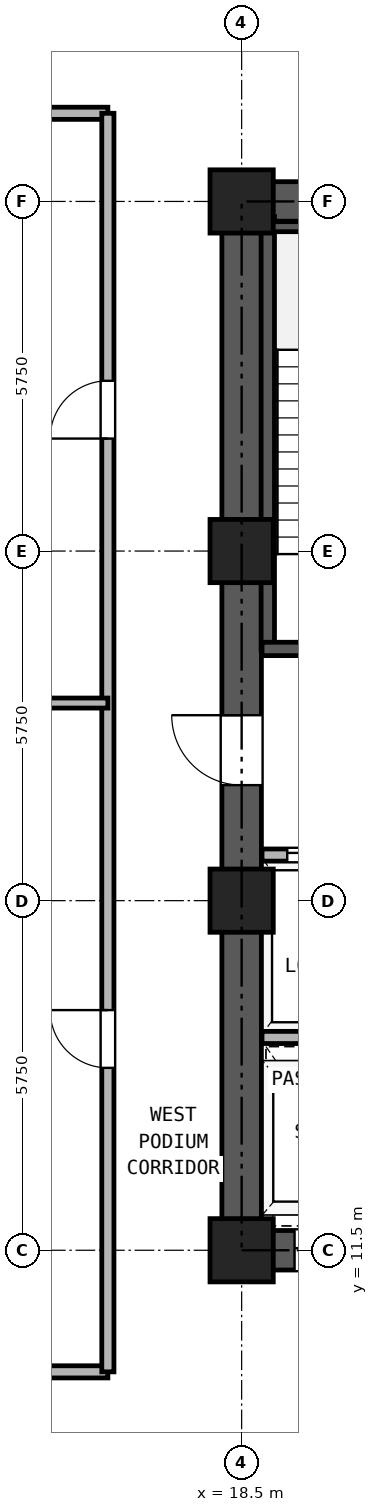
"""IFC4 building model, lengths in metres.
Left out: names, types, materials, properties, quantities, classifications, styles, units other than length and angle.
Written with IfcOpenShell. Run it as: python <this file> out.ifc"""

import sys

from ifc_helpers import new_model, si_unit, direction, frame, frame_2d, origin, origin_2d, place, context, subcontext, project, spatial, rectangle, hollow_rectangle, extrude, source, transform, mapped, element, fill, save


model = new_model("IFC4")
c1 = context("Model", 3, precision=1e-05, world=origin(), true_north=direction((0.0, 1.0)))
c2 = subcontext(c1, "Body", "Model", "MODEL_VIEW")
j1 = project(units=[si_unit("LENGTHUNIT", "METRE"), si_unit("PLANEANGLEUNIT", "RADIAN")], contexts=[c1])
p1 = place(None, origin())
s1 = spatial("IfcSite", under=j1, at=p1, CompositionType="ELEMENT")
p2 = place(p1, origin())
s2 = spatial("IfcBuilding", under=s1, at=p2, CompositionType="ELEMENT")
p3 = place(p2, frame((0.0, 0.0, 13.5)))
s3 = spatial("IfcBuildingStorey", under=s2, at=p3, CompositionType="ELEMENT", Elevation=13.5)
m1 = source(origin(), c2, "Body", "SweptSolid", [
    extrude(hollow_rectangle(XDim=1.04, YDim=1.04, WallThickness=0.065, at=origin_2d()), origin(), (0.0, 0.0, 1.0), 4.18),
])
for number, where, z_axis, x_axis in (
    (1, (18.5, 11.5, 0.0), (0.0, 0.0, 1.0), (1.0, 0.0, 0.0)),
    (2, (18.5, 17.25, 0.0), (0.0, 0.0, 1.0), (1.0, 0.0, 0.0)),
    (3, (18.5, 23.0, 0.0), (0.0, 0.0, 1.0), (1.0, 0.0, 0.0)),
    (4, (18.5, 28.75, 0.0), (0.0, 0.0, 1.0), (1.0, 0.0, 0.0)),
):
    element("IfcColumn", number, at=place(p3, frame(where, z_axis=z_axis, x_axis=x_axis)), inside=s3, PredefinedType="COLUMN", context=c2, shape_type="MappedRepresentation", body=[
        mapped(m1, transform((0.0, 0.0, 0.0), x_axis=(1.0, 0.0, 0.0), y_axis=(0.0, 1.0, 0.0), z_axis=(0.0, 0.0, 1.0), scale=1.0)),
    ])
p4 = place(p3, frame((18.175, 11.5, 0.0), z_axis=(0.0, 0.0, 1.0), x_axis=(1.0, 0.0, 0.0)))
e5 = element("IfcWall", 5, at=p4, inside=s3, PredefinedType="SHEAR", context=c2, shape_type="SweptSolid", body=[
    extrude(rectangle(XDim=10.65, YDim=0.65, at=frame_2d((5.325, 0.0))), origin(), (0.0, 0.0, 1.0), 4.18),
])
p5 = place(p4, frame((1.195, 0.0, 0.0)))
e6 = element("IfcOpeningElement", 6, at=p5, cuts=e5, PredefinedType="OPENING", context=c2, shape_type="SweptSolid", body=[
    extrude(rectangle(XDim=1.1, YDim=2.25, at=frame_2d((0.55, 1.125))), frame((0.0, 0.335, 0.0), z_axis=(0.0, -1.0, 0.0), x_axis=(1.0, 0.0, 0.0)), (0.0, 0.0, 1.0), 0.67),
])
p6 = place(p4, frame((3.495, 0.0, 0.0)))
e7 = element("IfcOpeningElement", 7, at=p6, cuts=e5, PredefinedType="OPENING", context=c2, shape_type="SweptSolid", body=[
    extrude(rectangle(XDim=1.1, YDim=2.25, at=frame_2d((0.55, 1.125))), frame((0.0, 0.335, 0.0), z_axis=(0.0, -1.0, 0.0), x_axis=(1.0, 0.0, 0.0)), (0.0, 0.0, 1.0), 0.67),
])
p7 = place(p4, frame((5.925, 0.0, 0.0)))
e8 = element("IfcOpeningElement", 8, at=p7, cuts=e5, PredefinedType="OPENING", context=c2, shape_type="SweptSolid", body=[
    extrude(rectangle(XDim=1.1, YDim=2.25, at=frame_2d((0.55, 1.125))), frame((0.0, 0.335, 0.0), z_axis=(0.0, -1.0, 0.0), x_axis=(1.0, 0.0, 0.0)), (0.0, 0.0, 1.0), 0.67),
])
p8 = place(p4, frame((8.325, 0.0, 0.0)))
e9 = element("IfcOpeningElement", 9, at=p8, cuts=e5, PredefinedType="OPENING", context=c2, shape_type="SweptSolid", body=[
    extrude(rectangle(XDim=1.1, YDim=2.25, at=frame_2d((0.55, 1.125))), frame((0.0, 0.335, 0.0), z_axis=(0.0, -1.0, 0.0), x_axis=(1.0, 0.0, 0.0)), (0.0, 0.0, 1.0), 0.67),
])
p9 = place(p3, frame((18.175, 28.75, 0.0), z_axis=(0.0, 0.0, 1.0), x_axis=(1.0, 0.0, 0.0)))
e10 = element("IfcWall", 10, at=p9, inside=s3, PredefinedType="SHEAR", context=c2, shape_type="SweptSolid", body=[
    extrude(rectangle(XDim=10.65, YDim=0.65, at=frame_2d((5.325, 0.0))), origin(), (0.0, 0.0, 1.0), 4.18),
])
p10 = place(p9, frame((4.205, 0.0, 0.0)))
e11 = element("IfcOpeningElement", 11, at=p10, cuts=e10, PredefinedType="OPENING", context=c2, shape_type="SweptSolid", body=[
    extrude(rectangle(XDim=0.9, YDim=2.05, at=frame_2d((0.45, 1.025))), frame((0.0, 0.335, 0.0), z_axis=(0.0, -1.0, 0.0), x_axis=(1.0, 0.0, 0.0)), (0.0, 0.0, 1.0), 0.67),
])
p11 = place(p9, frame((5.745, 0.0, 0.0)))
e12 = element("IfcOpeningElement", 12, at=p11, cuts=e10, PredefinedType="OPENING", context=c2, shape_type="SweptSolid", body=[
    extrude(rectangle(XDim=0.9, YDim=2.05, at=frame_2d((0.45, 1.025))), frame((0.0, 0.335, 0.0), z_axis=(0.0, -1.0, 0.0), x_axis=(1.0, 0.0, 0.0)), (0.0, 0.0, 1.0), 0.67),
])
p12 = place(p3, frame((18.5, 11.825, 0.0), z_axis=(0.0, 0.0, 1.0), x_axis=(0.0, 1.0, 0.0)))
e13 = element("IfcWall", 13, at=p12, inside=s3, PredefinedType="SHEAR", context=c2, shape_type="SweptSolid", body=[
    extrude(rectangle(XDim=16.6, YDim=0.65, at=frame_2d((8.3, 0.0))), origin(), (0.0, 0.0, 1.0), 4.18),
])
p13 = place(p12, frame((7.325, 0.0, 0.0)))
e14 = element("IfcOpeningElement", 14, at=p13, cuts=e13, PredefinedType="OPENING", context=c2, shape_type="SweptSolid", body=[
    extrude(rectangle(XDim=1.15, YDim=2.2, at=frame_2d((0.575, 1.1))), frame((0.0, 0.335, 0.0), z_axis=(0.0, -1.0, 0.0), x_axis=(1.0, 0.0, 0.0)), (0.0, 0.0, 1.0), 0.67),
])
p14 = place(p3, frame((18.93, 21.39, 0.0), z_axis=(0.0, 0.0, 1.0), x_axis=(0.0, 1.0, 0.0)))
e15 = element("IfcWall", 15, at=p14, inside=s3, PredefinedType="SOLIDWALL", context=c2, shape_type="SweptSolid", body=[
    extrude(rectangle(XDim=7.11, YDim=0.22, at=frame_2d((3.555, 0.0))), origin(), (0.0, 0.0, 1.0), 4.18),
])
p15 = place(p3, frame((18.835, 28.335, 0.0), z_axis=(0.0, 0.0, 1.0), x_axis=(1.0, 0.0, 0.0)))
e16 = element("IfcWall", 16, at=p15, inside=s3, PredefinedType="PARTITIONING", context=c2, shape_type="SweptSolid", body=[
    extrude(rectangle(XDim=3.275, YDim=0.165, at=frame_2d((1.638, 0.0))), origin(), (0.0, 0.0, 1.0), 4.18),
])
p16 = place(p3, frame((18.835, 21.39, 0.0), z_axis=(0.0, 0.0, 1.0), x_axis=(1.0, 0.0, 0.0)))
e17 = element("IfcWall", 17, at=p16, inside=s3, PredefinedType="SOLIDWALL", context=c2, shape_type="SweptSolid", body=[
    extrude(rectangle(XDim=6.295, YDim=0.22, at=frame_2d((3.147, 0.0))), origin(), (0.0, 0.0, 1.0), 4.18),
])
p17 = place(p16, frame((1.015, 0.0, 0.0)))
e18 = element("IfcOpeningElement", 18, at=p17, cuts=e17, PredefinedType="OPENING", context=c2, shape_type="SweptSolid", body=[
    extrude(rectangle(XDim=1.15, YDim=2.2, at=frame_2d((0.575, 1.1))), frame((0.0, 0.12, 0.0), z_axis=(0.0, -1.0, 0.0), x_axis=(1.0, 0.0, 0.0)), (0.0, 0.0, 1.0), 0.24),
])
p18 = place(p16, frame((4.745, 0.0, 0.0)))
e19 = element("IfcOpeningElement", 19, at=p18, cuts=e17, PredefinedType="OPENING", context=c2, shape_type="SweptSolid", body=[
    extrude(rectangle(XDim=1.1, YDim=2.25, at=frame_2d((0.55, 1.125))), frame((0.0, 0.12, 0.0), z_axis=(0.0, -1.0, 0.0), x_axis=(1.0, 0.0, 0.0)), (0.0, 0.0, 1.0), 0.24),
])
p19 = place(p3, frame((18.835, 18.0, 0.0), z_axis=(0.0, 0.0, 1.0), x_axis=(1.0, 0.0, 0.0)))
e20 = element("IfcWall", 20, at=p19, inside=s3, PredefinedType="PARTITIONING", context=c2, shape_type="SweptSolid", body=[
    extrude(rectangle(XDim=9.33, YDim=0.2, at=frame_2d((4.665, 0.0))), origin(), (0.0, 0.0, 1.0), 4.18),
])
p20 = place(p19, frame((0.415, 0.0, 0.0)))
e21 = element("IfcOpeningElement", 21, at=p20, cuts=e20, PredefinedType="OPENING", context=c2, shape_type="SweptSolid", body=[
    extrude(rectangle(XDim=1.3, YDim=2.3, at=frame_2d((0.65, 1.15))), frame((0.0, 0.11, 0.0), z_axis=(0.0, -1.0, 0.0), x_axis=(1.0, 0.0, 0.0)), (0.0, 0.0, 1.0), 0.22),
])
p21 = place(p19, frame((2.515, 0.0, 0.0)))
e22 = element("IfcOpeningElement", 22, at=p21, cuts=e20, PredefinedType="OPENING", context=c2, shape_type="SweptSolid", body=[
    extrude(rectangle(XDim=1.3, YDim=2.3, at=frame_2d((0.65, 1.15))), frame((0.0, 0.11, 0.0), z_axis=(0.0, -1.0, 0.0), x_axis=(1.0, 0.0, 0.0)), (0.0, 0.0, 1.0), 0.22),
])
p22 = place(p19, frame((4.915, 0.0, 0.0)))
e23 = element("IfcOpeningElement", 23, at=p22, cuts=e20, PredefinedType="OPENING", context=c2, shape_type="SweptSolid", body=[
    extrude(rectangle(XDim=0.9, YDim=2.05, at=frame_2d((0.45, 1.025))), frame((0.0, 0.11, 0.0), z_axis=(0.0, -1.0, 0.0), x_axis=(1.0, 0.0, 0.0)), (0.0, 0.0, 1.0), 0.22),
])
p23 = place(p19, frame((7.615, 0.0, 0.0)))
e24 = element("IfcOpeningElement", 24, at=p23, cuts=e20, PredefinedType="OPENING", context=c2, shape_type="SweptSolid", body=[
    extrude(rectangle(XDim=0.9, YDim=2.05, at=frame_2d((0.45, 1.025))), frame((0.0, 0.11, 0.0), z_axis=(0.0, -1.0, 0.0), x_axis=(1.0, 0.0, 0.0)), (0.0, 0.0, 1.0), 0.22),
])
p24 = place(p3, frame((18.835, 15.0, 0.0), z_axis=(0.0, 0.0, 1.0), x_axis=(1.0, 0.0, 0.0)))
e25 = element("IfcWall", 25, at=p24, inside=s3, PredefinedType="PARTITIONING", context=c2, shape_type="SweptSolid", body=[
    extrude(rectangle(XDim=9.33, YDim=0.2, at=frame_2d((4.665, 0.0))), origin(), (0.0, 0.0, 1.0), 4.18),
])
for number, where, z_axis, x_axis in (
    (26, (10.5, 9.5, 0.0), (0.0, 0.0, 1.0), (1.0, 0.0, 0.0)),
    (27, (10.5, 30.2, 0.0), (0.0, 0.0, 1.0), (1.0, 0.0, 0.0)),
):
    element("IfcWall", number, at=place(p3, frame(where, z_axis=z_axis, x_axis=x_axis)), inside=s3, PredefinedType="PARTITIONING", context=c2, shape_type="SweptSolid", body=[
        extrude(rectangle(XDim=5.8, YDim=0.2, at=frame_2d((2.9, 0.0))), origin(), (0.0, 0.0, 1.0), 4.18),
    ])
p25 = place(p3, frame((16.3, 9.5, 0.0), z_axis=(0.0, 0.0, 1.0), x_axis=(0.0, 1.0, 0.0)))
e28 = element("IfcWall", 28, at=p25, inside=s3, PredefinedType="PARTITIONING", context=c2, shape_type="SweptSolid", body=[
    extrude(rectangle(XDim=20.7, YDim=0.2, at=frame_2d((10.35, 0.0))), origin(), (0.0, 0.0, 1.0), 4.18),
])
p26 = place(p25, frame((5.0, 0.0, 0.0)))
e29 = element("IfcOpeningElement", 29, at=p26, cuts=e28, PredefinedType="OPENING", context=c2, shape_type="SweptSolid", body=[
    extrude(rectangle(XDim=0.95, YDim=2.15, at=frame_2d((0.475, 1.075))), frame((0.0, 0.11, 0.0), z_axis=(0.0, -1.0, 0.0), x_axis=(1.0, 0.0, 0.0)), (0.0, 0.0, 1.0), 0.22),
])
p27 = place(p25, frame((15.35, 0.0, 0.0)))
e30 = element("IfcOpeningElement", 30, at=p27, cuts=e28, PredefinedType="OPENING", context=c2, shape_type="SweptSolid", body=[
    extrude(rectangle(XDim=0.95, YDim=2.15, at=frame_2d((0.475, 1.075))), frame((0.0, 0.11, 0.0), z_axis=(0.0, -1.0, 0.0), x_axis=(1.0, 0.0, 0.0)), (0.0, 0.0, 1.0), 0.22),
])
p28 = place(p3, frame((0.25, 20.5, 0.0), z_axis=(0.0, 0.0, 1.0), x_axis=(1.0, 0.0, 0.0)))
e31 = element("IfcWall", 31, at=p28, inside=s3, PredefinedType="PARTITIONING", context=c2, shape_type="SweptSolid", body=[
    extrude(rectangle(XDim=16.05, YDim=0.165, at=frame_2d((8.025, 0.0))), origin(), (0.0, 0.0, 1.0), 4.18),
])
p29 = place(p20, origin())
e32 = element("IfcDoor", 32, at=p29, inside=s3, OperationType="DOUBLE_DOOR_SLIDING", PredefinedType="DOOR", context=c2, shape_type="SweptSolid", body=[
    extrude(rectangle(XDim=1.3, YDim=2.3, at=frame_2d((0.65, 1.15))), frame((0.0, 0.025, 0.0), z_axis=(0.0, -1.0, 0.0), x_axis=(1.0, 0.0, 0.0)), (0.0, 0.0, 1.0), 0.05),
])
fill(e21, e32)
p30 = place(p13, frame((1.15, 0.0, 0.0), z_axis=(0.0, 0.0, 1.0), x_axis=(-1.0, 0.0, 0.0)))
e33 = element("IfcDoor", 33, at=p30, inside=s3, OperationType="SINGLE_SWING_RIGHT", PredefinedType="DOOR", context=c2, shape_type="SweptSolid", body=[
    extrude(rectangle(XDim=1.15, YDim=2.2, at=frame_2d((0.575, 1.1))), frame((0.0, 0.025, 0.0), z_axis=(0.0, -1.0, 0.0), x_axis=(1.0, 0.0, 0.0)), (0.0, 0.0, 1.0), 0.05),
])
fill(e14, e33)
p31 = place(p5, frame((1.1, 0.0, 0.0), z_axis=(0.0, 0.0, 1.0), x_axis=(-1.0, 0.0, 0.0)))
e34 = element("IfcDoor", 34, at=p31, inside=s3, OperationType="DOUBLE_DOOR_SLIDING", PredefinedType="DOOR", context=c2, shape_type="SweptSolid", body=[
    extrude(rectangle(XDim=1.1, YDim=2.25, at=frame_2d((0.55, 1.125))), frame((0.0, 0.025, 0.0), z_axis=(0.0, -1.0, 0.0), x_axis=(1.0, 0.0, 0.0)), (0.0, 0.0, 1.0), 0.05),
])
fill(e6, e34)
p32 = place(p26, frame((0.95, 0.0, 0.0), z_axis=(0.0, 0.0, 1.0), x_axis=(-1.0, 0.0, 0.0)))
e35 = element("IfcDoor", 35, at=p32, inside=s3, OperationType="SINGLE_SWING_RIGHT", PredefinedType="DOOR", context=c2, shape_type="SweptSolid", body=[
    extrude(rectangle(XDim=0.95, YDim=2.15, at=frame_2d((0.475, 1.075))), frame((0.0, 0.025, 0.0), z_axis=(0.0, -1.0, 0.0), x_axis=(1.0, 0.0, 0.0)), (0.0, 0.0, 1.0), 0.05),
])
fill(e29, e35)
p33 = place(p27, frame((0.95, 0.0, 0.0), z_axis=(0.0, 0.0, 1.0), x_axis=(-1.0, 0.0, 0.0)))
e36 = element("IfcDoor", 36, at=p33, inside=s3, OperationType="SINGLE_SWING_LEFT", PredefinedType="DOOR", context=c2, shape_type="SweptSolid", body=[
    extrude(rectangle(XDim=0.95, YDim=2.15, at=frame_2d((0.475, 1.075))), frame((0.0, 0.025, 0.0), z_axis=(0.0, -1.0, 0.0), x_axis=(1.0, 0.0, 0.0)), (0.0, 0.0, 1.0), 0.05),
])
fill(e30, e36)
save(model, sys.argv[1])
